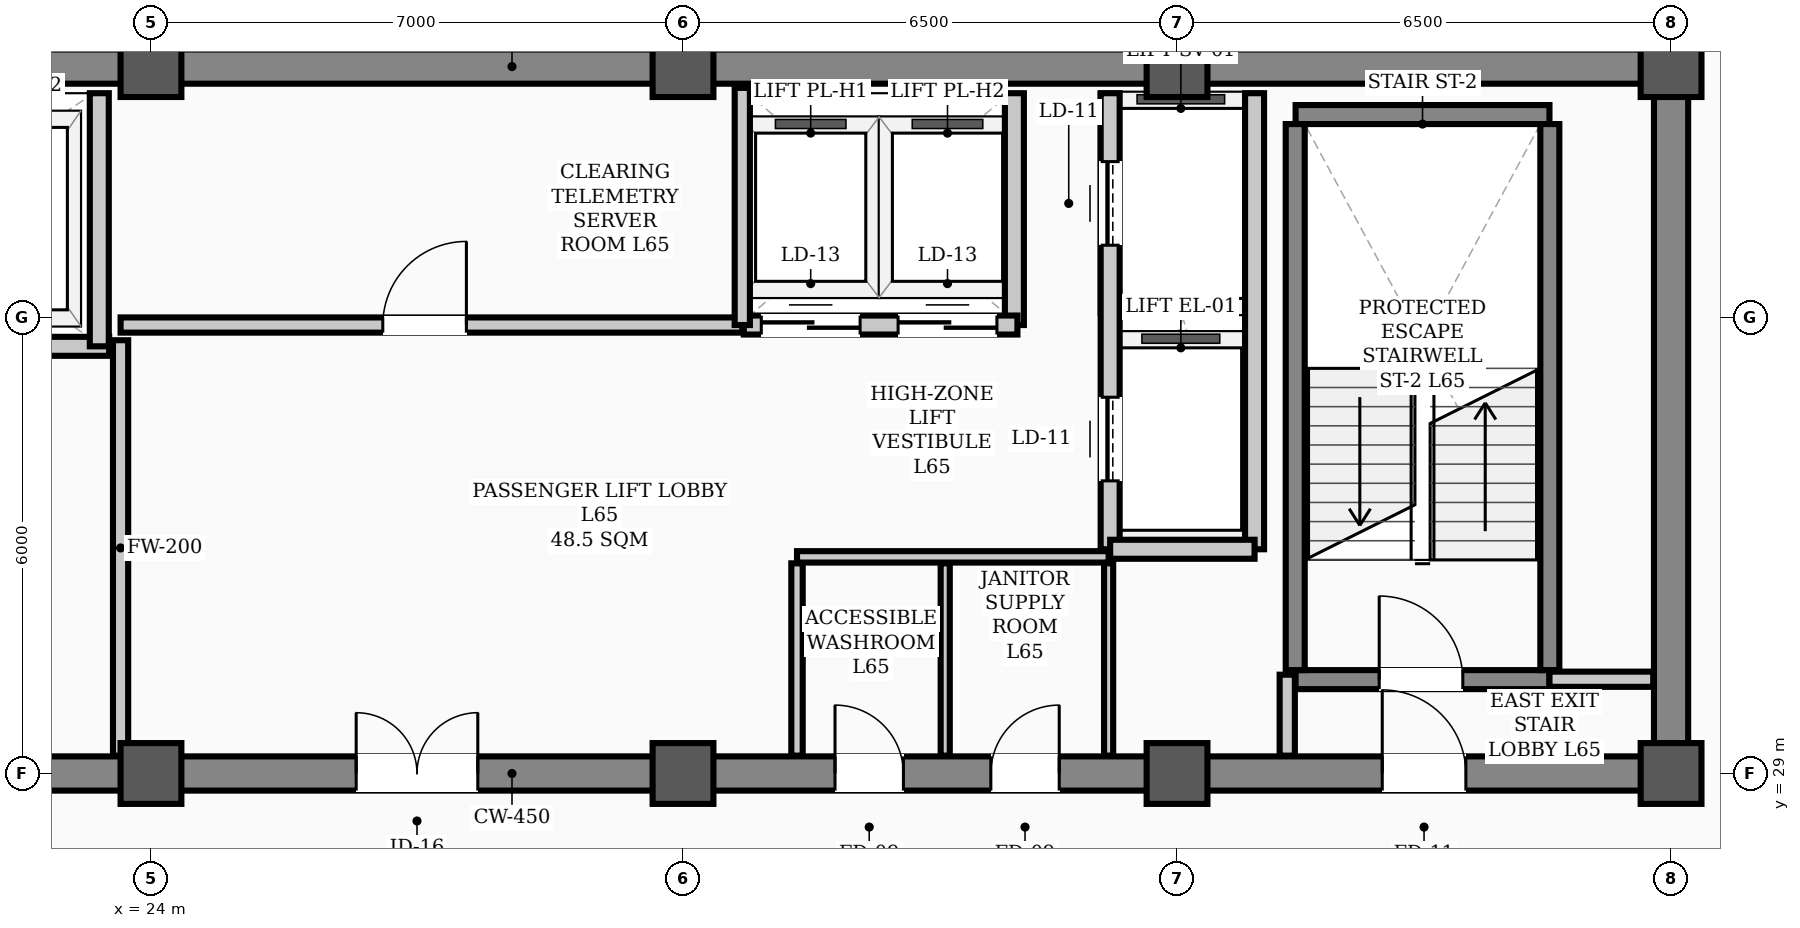
"""IFC4 building model, lengths in metres.
Left out: names, types, materials, properties, quantities, classifications, styles, units other than length and angle.
Written with IfcOpenShell. Run it as: python <this file> out.ifc"""

import sys

from ifc_helpers import new_model, si_unit, direction, frame, frame_2d, origin, origin_2d, place, context, subcontext, project, spatial, rectangle, hollow_rectangle, extrude, element, fill, save


model = new_model("IFC4")
c1 = context("Model", 3, precision=1e-05, world=origin(), true_north=direction((0.0, 1.0)))
c2 = subcontext(c1, "Body", "Model", "MODEL_VIEW")
j1 = project(units=[si_unit("LENGTHUNIT", "METRE"), si_unit("PLANEANGLEUNIT", "RADIAN")], contexts=[c1])
p1 = place(None, origin())
s1 = spatial("IfcSite", under=j1, at=p1, CompositionType="ELEMENT")
p2 = place(p1, origin())
s2 = spatial("IfcBuilding", under=s1, at=p2, CompositionType="ELEMENT")
p3 = place(p2, frame((0.0, 0.0, 261.8)))
s3 = spatial("IfcBuildingStorey", under=s2, at=p3, CompositionType="ELEMENT", Elevation=261.8)
for number, where, z_axis, x_axis in (
    (1, (24.0, 29.0, 0.0), (0.0, 0.0, 1.0), (1.0, 0.0, 0.0)),
    (2, (24.0, 38.3, 0.0), (0.0, 0.0, 1.0), (1.0, 0.0, 0.0)),
    (3, (31.0, 29.0, 0.0), (0.0, 0.0, 1.0), (1.0, 0.0, 0.0)),
    (4, (31.0, 38.3, 0.0), (0.0, 0.0, 1.0), (1.0, 0.0, 0.0)),
    (5, (37.5, 29.0, 0.0), (0.0, 0.0, 1.0), (1.0, 0.0, 0.0)),
    (6, (37.5, 38.3, 0.0), (0.0, 0.0, 1.0), (1.0, 0.0, 0.0)),
    (7, (44.0, 29.0, 0.0), (0.0, 0.0, 1.0), (1.0, 0.0, 0.0)),
    (8, (44.0, 38.3, 0.0), (0.0, 0.0, 1.0), (1.0, 0.0, 0.0)),
):
    element("IfcColumn", number, at=place(p3, frame(where, z_axis=z_axis, x_axis=x_axis)), inside=s3, PredefinedType="COLUMN", context=c2, shape_type="SweptSolid", body=[
        extrude(hollow_rectangle(XDim=0.8, YDim=0.8, WallThickness=0.032, InnerFilletRadius=0.016, OuterFilletRadius=0.048, at=origin_2d()), origin(), (0.0, 0.0, 1.0), 3.9),
    ])
p4 = place(p3, frame((13.5, 29.0, 0.0), z_axis=(0.0, 0.0, 1.0), x_axis=(1.0, 0.0, 0.0)))
e9 = element("IfcWall", 9, at=p4, inside=s3, PredefinedType="SHEAR", context=c2, shape_type="SweptSolid", body=[
    extrude(rectangle(XDim=30.5, YDim=0.45, at=frame_2d((15.25, 0.0))), origin(), (0.0, 0.0, 1.0), 3.72),
])
p5 = place(p4, frame((1.75, 0.0, 0.0)))
e10 = element("IfcOpeningElement", 10, at=p5, cuts=e9, PredefinedType="OPENING", context=c2, shape_type="SweptSolid", body=[
    extrude(rectangle(XDim=1.1, YDim=2.08, at=frame_2d((0.55, 1.04))), frame((0.0, 0.235, 0.0), z_axis=(0.0, -1.0, 0.0), x_axis=(1.0, 0.0, 0.0)), (0.0, 0.0, 1.0), 0.47),
])
p6 = place(p4, frame((26.7, 0.0, 0.0)))
e11 = element("IfcOpeningElement", 11, at=p6, cuts=e9, PredefinedType="OPENING", context=c2, shape_type="SweptSolid", body=[
    extrude(rectangle(XDim=1.1, YDim=2.08, at=frame_2d((0.55, 1.04))), frame((0.0, 0.235, 0.0), z_axis=(0.0, -1.0, 0.0), x_axis=(1.0, 0.0, 0.0)), (0.0, 0.0, 1.0), 0.47),
])
p7 = place(p4, frame((6.8, 0.0, 0.0)))
e12 = element("IfcOpeningElement", 12, at=p7, cuts=e9, PredefinedType="OPENING", context=c2, shape_type="SweptSolid", body=[
    extrude(rectangle(XDim=1.1, YDim=2.08, at=frame_2d((0.55, 1.04))), frame((0.0, 0.235, 0.0), z_axis=(0.0, -1.0, 0.0), x_axis=(1.0, 0.0, 0.0)), (0.0, 0.0, 1.0), 0.47),
])
p8 = place(p4, frame((13.2, 0.0, 0.0)))
e13 = element("IfcOpeningElement", 13, at=p8, cuts=e9, PredefinedType="OPENING", context=c2, shape_type="SweptSolid", body=[
    extrude(rectangle(XDim=1.6, YDim=2.08, at=frame_2d((0.8, 1.04))), frame((0.0, 0.235, 0.0), z_axis=(0.0, -1.0, 0.0), x_axis=(1.0, 0.0, 0.0)), (0.0, 0.0, 1.0), 0.47),
])
p9 = place(p4, frame((19.5, 0.0, 0.0)))
e14 = element("IfcOpeningElement", 14, at=p9, cuts=e9, PredefinedType="OPENING", context=c2, shape_type="SweptSolid", body=[
    extrude(rectangle(XDim=0.9, YDim=2.08, at=frame_2d((0.45, 1.04))), frame((0.0, 0.235, 0.0), z_axis=(0.0, -1.0, 0.0), x_axis=(1.0, 0.0, 0.0)), (0.0, 0.0, 1.0), 0.47),
])
p10 = place(p4, frame((21.55, 0.0, 0.0)))
e15 = element("IfcOpeningElement", 15, at=p10, cuts=e9, PredefinedType="OPENING", context=c2, shape_type="SweptSolid", body=[
    extrude(rectangle(XDim=0.9, YDim=2.08, at=frame_2d((0.45, 1.04))), frame((0.0, 0.235, 0.0), z_axis=(0.0, -1.0, 0.0), x_axis=(1.0, 0.0, 0.0)), (0.0, 0.0, 1.0), 0.47),
])
p11 = place(p3, frame((13.5, 38.3, 0.0), z_axis=(0.0, 0.0, 1.0), x_axis=(1.0, 0.0, 0.0)))
e16 = element("IfcWall", 16, at=p11, inside=s3, PredefinedType="SHEAR", context=c2, shape_type="SweptSolid", body=[
    extrude(rectangle(XDim=30.5, YDim=0.45, at=frame_2d((15.25, 0.0))), origin(), (0.0, 0.0, 1.0), 3.72),
])
p12 = place(p3, frame((44.0, 29.35, 0.0), z_axis=(0.0, 0.0, 1.0), x_axis=(0.0, 1.0, 0.0)))
e17 = element("IfcWall", 17, at=p12, inside=s3, PredefinedType="SHEAR", context=c2, shape_type="SweptSolid", body=[
    extrude(rectangle(XDim=8.6, YDim=0.45, at=frame_2d((4.3, 0.0))), origin(), (0.0, 0.0, 1.0), 3.72),
])
p13 = place(p3, frame((39.06, 30.235, 0.0), z_axis=(0.0, 0.0, 1.0), x_axis=(1.0, 0.0, 0.0)))
e18 = element("IfcWall", 18, at=p13, inside=s3, PredefinedType="STANDARD", context=c2, shape_type="SweptSolid", body=[
    extrude(rectangle(XDim=3.34, YDim=0.25, at=frame_2d((1.67, 0.0))), origin(), (0.0, 0.0, 1.0), 3.72),
])
p14 = place(p13, frame((1.1, 0.0, 0.0)))
e19 = element("IfcOpeningElement", 19, at=p14, cuts=e18, PredefinedType="OPENING", context=c2, shape_type="SweptSolid", body=[
    extrude(rectangle(XDim=1.1, YDim=2.08, at=frame_2d((0.55, 1.04))), frame((0.0, 0.135, 0.0), z_axis=(0.0, -1.0, 0.0), x_axis=(1.0, 0.0, 0.0)), (0.0, 0.0, 1.0), 0.27),
])
p15 = place(p3, frame((39.06, 37.669, 0.0), z_axis=(0.0, 0.0, 1.0), x_axis=(1.0, 0.0, 0.0)))
e20 = element("IfcWall", 20, at=p15, inside=s3, PredefinedType="STANDARD", context=c2, shape_type="SweptSolid", body=[
    extrude(rectangle(XDim=3.34, YDim=0.25, at=frame_2d((1.67, 0.0))), origin(), (0.0, 0.0, 1.0), 3.72),
])
for number, where, z_axis, x_axis in (
    (21, (39.055, 30.36, 0.0), (0.0, 0.0, 1.0), (0.0, 1.0, 0.0)),
    (22, (42.405, 30.36, 0.0), (0.0, 0.0, 1.0), (0.0, 1.0, 0.0)),
):
    element("IfcWall", number, at=place(p3, frame(where, z_axis=z_axis, x_axis=x_axis)), inside=s3, PredefinedType="STANDARD", context=c2, shape_type="SweptSolid", body=[
        extrude(rectangle(XDim=7.184, YDim=0.25, at=frame_2d((3.592, 0.0))), origin(), (0.0, 0.0, 1.0), 3.72),
    ])
p16 = place(p3, frame((18.1, 34.62, 0.0), z_axis=(0.0, 0.0, 1.0), x_axis=(1.0, 0.0, 0.0)))
e23 = element("IfcWall", 23, at=p16, inside=s3, PredefinedType="STANDARD", context=c2, shape_type="SweptSolid", body=[
    extrude(rectangle(XDim=5.35, YDim=0.25, at=frame_2d((2.675, 0.0))), origin(), (0.0, 0.0, 1.0), 3.72),
])
p17 = place(p16, frame((0.85, 0.0, 0.0)))
e24 = element("IfcOpeningElement", 24, at=p17, cuts=e23, PredefinedType="OPENING", context=c2, shape_type="SweptSolid", body=[
    extrude(rectangle(XDim=1.1, YDim=2.08, at=frame_2d((0.55, 1.04))), frame((0.0, 0.135, 0.0), z_axis=(0.0, -1.0, 0.0), x_axis=(1.0, 0.0, 0.0)), (0.0, 0.0, 1.0), 0.27),
])
p18 = place(p16, frame((3.45, 0.0, 0.0)))
e25 = element("IfcOpeningElement", 25, at=p18, cuts=e23, PredefinedType="OPENING", context=c2, shape_type="SweptSolid", body=[
    extrude(rectangle(XDim=1.1, YDim=2.08, at=frame_2d((0.55, 1.04))), frame((0.0, 0.135, 0.0), z_axis=(0.0, -1.0, 0.0), x_axis=(1.0, 0.0, 0.0)), (0.0, 0.0, 1.0), 0.27),
])
p19 = place(p3, frame((36.62, 31.95, 0.0), z_axis=(0.0, 0.0, 1.0), x_axis=(0.0, 1.0, 0.0)))
e26 = element("IfcWall", 26, at=p19, inside=s3, PredefinedType="STANDARD", context=c2, shape_type="SweptSolid", body=[
    extrude(rectangle(XDim=6.0, YDim=0.25, at=frame_2d((3.0, 0.0))), origin(), (0.0, 0.0, 1.0), 3.4),
])
p20 = place(p19, frame((0.9, 0.0, 0.0)))
e27 = element("IfcOpeningElement", 27, at=p20, cuts=e26, PredefinedType="OPENING", context=c2, shape_type="SweptSolid", body=[
    extrude(rectangle(XDim=1.1, YDim=2.08, at=frame_2d((0.55, 1.04))), frame((0.0, 0.135, 0.0), z_axis=(0.0, -1.0, 0.0), x_axis=(1.0, 0.0, 0.0)), (0.0, 0.0, 1.0), 0.27),
])
p21 = place(p19, frame((4.0, 0.0, 0.0)))
e28 = element("IfcOpeningElement", 28, at=p21, cuts=e26, PredefinedType="OPENING", context=c2, shape_type="SweptSolid", body=[
    extrude(rectangle(XDim=1.1, YDim=2.08, at=frame_2d((0.55, 1.04))), frame((0.0, 0.135, 0.0), z_axis=(0.0, -1.0, 0.0), x_axis=(1.0, 0.0, 0.0)), (0.0, 0.0, 1.0), 0.27),
])
p22 = place(p3, frame((38.52, 31.95, 0.0), z_axis=(0.0, 0.0, 1.0), x_axis=(0.0, 1.0, 0.0)))
e29 = element("IfcWall", 29, at=p22, inside=s3, PredefinedType="STANDARD", context=c2, shape_type="SweptSolid", body=[
    extrude(rectangle(XDim=6.0, YDim=0.25, at=frame_2d((3.0, 0.0))), origin(), (0.0, 0.0, 1.0), 3.48),
])
p23 = place(p3, frame((36.62, 31.95, 0.0), z_axis=(0.0, 0.0, 1.0), x_axis=(1.0, 0.0, 0.0)))
e30 = element("IfcWall", 30, at=p23, inside=s3, PredefinedType="STANDARD", context=c2, shape_type="SweptSolid", body=[
    extrude(rectangle(XDim=1.9, YDim=0.25, at=frame_2d((0.95, 0.0))), origin(), (0.0, 0.0, 1.0), 3.48),
])
p24 = place(p3, frame((23.32, 34.62, 0.0), z_axis=(0.0, 0.0, 1.0), x_axis=(0.0, 1.0, 0.0)))
e31 = element("IfcWall", 31, at=p24, inside=s3, PredefinedType="STANDARD", context=c2, shape_type="SweptSolid", body=[
    extrude(rectangle(XDim=3.33, YDim=0.25, at=frame_2d((1.665, 0.0))), origin(), (0.0, 0.0, 1.0), 3.4),
])
p25 = place(p3, frame((35.36, 34.9, 0.0), z_axis=(0.0, 0.0, 1.0), x_axis=(0.0, 1.0, 0.0)))
e32 = element("IfcWall", 32, at=p25, inside=s3, PredefinedType="STANDARD", context=c2, shape_type="SweptSolid", body=[
    extrude(rectangle(XDim=3.05, YDim=0.25, at=frame_2d((1.525, 0.0))), origin(), (0.0, 0.0, 1.0), 3.4),
])
p26 = place(p3, frame((31.8, 34.9, 0.0), z_axis=(0.0, 0.0, 1.0), x_axis=(1.0, 0.0, 0.0)))
e33 = element("IfcWall", 33, at=p26, inside=s3, PredefinedType="STANDARD", context=c2, shape_type="SweptSolid", body=[
    extrude(rectangle(XDim=3.6, YDim=0.25, at=frame_2d((1.8, 0.0))), origin(), (0.0, 0.0, 1.0), 3.72),
])
p27 = place(p26, frame((0.23, 0.0, 0.0)))
e34 = element("IfcOpeningElement", 34, at=p27, cuts=e33, PredefinedType="OPENING", context=c2, shape_type="SweptSolid", body=[
    extrude(rectangle(XDim=1.3, YDim=2.08, at=frame_2d((0.65, 1.04))), frame((0.0, 0.135, 0.0), z_axis=(0.0, -1.0, 0.0), x_axis=(1.0, 0.0, 0.0)), (0.0, 0.0, 1.0), 0.27),
])
p28 = place(p26, frame((2.03, 0.0, 0.0)))
e35 = element("IfcOpeningElement", 35, at=p28, cuts=e33, PredefinedType="OPENING", context=c2, shape_type="SweptSolid", body=[
    extrude(rectangle(XDim=1.3, YDim=2.08, at=frame_2d((0.65, 1.04))), frame((0.0, 0.135, 0.0), z_axis=(0.0, -1.0, 0.0), x_axis=(1.0, 0.0, 0.0)), (0.0, 0.0, 1.0), 0.27),
])
p29 = place(p3, frame((42.4, 30.24, 0.0), z_axis=(0.0, 0.0, 1.0), x_axis=(1.0, 0.0, 0.0)))
e36 = element("IfcWall", 36, at=p29, inside=s3, PredefinedType="STANDARD", context=c2, shape_type="SweptSolid", body=[
    extrude(rectangle(XDim=1.365, YDim=0.2, at=frame_2d((0.683, 0.0))), origin(), (0.0, 0.0, 1.0), 3.72),
])
p30 = place(p3, frame((23.6, 34.9, 0.0), z_axis=(0.0, 0.0, 1.0), x_axis=(1.0, 0.0, 0.0)))
e37 = element("IfcWall", 37, at=p30, inside=s3, PredefinedType="STANDARD", context=c2, shape_type="SweptSolid", body=[
    extrude(rectangle(XDim=8.18, YDim=0.2, at=frame_2d((4.09, 0.0))), origin(), (0.0, 0.0, 1.0), 3.72),
])
p31 = place(p30, frame((3.45, 0.0, 0.0)))
e38 = element("IfcOpeningElement", 38, at=p31, cuts=e37, PredefinedType="OPENING", context=c2, shape_type="SweptSolid", body=[
    extrude(rectangle(XDim=1.1, YDim=2.08, at=frame_2d((0.55, 1.04))), frame((0.0, 0.11, 0.0), z_axis=(0.0, -1.0, 0.0), x_axis=(1.0, 0.0, 0.0)), (0.0, 0.0, 1.0), 0.22),
])
p32 = place(p3, frame((32.5, 31.85, 0.0), z_axis=(0.0, 0.0, 1.0), x_axis=(1.0, 0.0, 0.0)))
e39 = element("IfcWall", 39, at=p32, inside=s3, PredefinedType="PARTITIONING", context=c2, shape_type="SweptSolid", body=[
    extrude(rectangle(XDim=4.1, YDim=0.15, at=frame_2d((2.05, 0.0))), origin(), (0.0, 0.0, 1.0), 3.72),
])
p33 = place(p3, frame((38.95, 29.235, 0.0), z_axis=(0.0, 0.0, 1.0), x_axis=(0.0, 1.0, 0.0)))
e40 = element("IfcWall", 40, at=p33, inside=s3, PredefinedType="STANDARD", context=c2, shape_type="SweptSolid", body=[
    extrude(rectangle(XDim=1.065, YDim=0.2, at=frame_2d((0.532, 0.0))), origin(), (0.0, 0.0, 1.0), 3.72),
])
p34 = place(p3, frame((23.6, 29.235, 0.0), z_axis=(0.0, 0.0, 1.0), x_axis=(0.0, 1.0, 0.0)))
e41 = element("IfcWall", 41, at=p34, inside=s3, PredefinedType="STANDARD", context=c2, shape_type="SweptSolid", body=[
    extrude(rectangle(XDim=5.465, YDim=0.2, at=frame_2d((2.732, 0.0))), origin(), (0.0, 0.0, 1.0), 3.2),
])
p35 = place(p3, frame((32.5, 29.235, 0.0), z_axis=(0.0, 0.0, 1.0), x_axis=(0.0, 1.0, 0.0)))
e42 = element("IfcWall", 42, at=p35, inside=s3, PredefinedType="PARTITIONING", context=c2, shape_type="SweptSolid", body=[
    extrude(rectangle(XDim=2.53, YDim=0.15, at=frame_2d((1.265, 0.0))), origin(), (0.0, 0.0, 1.0), 3.4),
])
for number, where, z_axis, x_axis in (
    (43, (36.6, 29.235, 0.0), (0.0, 0.0, 1.0), (0.0, 1.0, 0.0)),
    (44, (34.45, 29.235, 0.0), (0.0, 0.0, 1.0), (0.0, 1.0, 0.0)),
):
    element("IfcWall", number, at=place(p3, frame(where, z_axis=z_axis, x_axis=x_axis)), inside=s3, PredefinedType="PARTITIONING", context=c2, shape_type="SweptSolid", body=[
        extrude(rectangle(XDim=2.53, YDim=0.12, at=frame_2d((1.265, 0.0))), origin(), (0.0, 0.0, 1.0), 3.4),
    ])
p36 = place(p3, frame((31.78, 34.9, 0.0), z_axis=(0.0, 0.0, 1.0), x_axis=(0.0, 1.0, 0.0)))
e45 = element("IfcWall", 45, at=p36, inside=s3, PredefinedType="STANDARD", context=c2, shape_type="SweptSolid", body=[
    extrude(rectangle(XDim=3.12, YDim=0.2, at=frame_2d((1.56, 0.0))), origin(), (0.0, 0.0, 1.0), 3.4),
])
p37 = place(p14, origin())
e46 = element("IfcDoor", 46, at=p37, inside=s3, OperationType="SINGLE_SWING_LEFT", PredefinedType="DOOR", context=c2, shape_type="SweptSolid", body=[
    extrude(rectangle(XDim=1.1, YDim=2.08, at=frame_2d((0.55, 1.04))), frame((0.0, 0.025, 0.0), z_axis=(0.0, -1.0, 0.0), x_axis=(1.0, 0.0, 0.0)), (0.0, 0.0, 1.0), 0.05),
])
fill(e19, e46)
p38 = place(p6, origin())
e47 = element("IfcDoor", 47, at=p38, inside=s3, OperationType="SINGLE_SWING_LEFT", PredefinedType="DOOR", context=c2, shape_type="SweptSolid", body=[
    extrude(rectangle(XDim=1.1, YDim=2.08, at=frame_2d((0.55, 1.04))), frame((0.0, 0.025, 0.0), z_axis=(0.0, -1.0, 0.0), x_axis=(1.0, 0.0, 0.0)), (0.0, 0.0, 1.0), 0.05),
])
fill(e11, e47)
p39 = place(p8, origin())
e48 = element("IfcDoor", 48, at=p39, inside=s3, OperationType="DOUBLE_DOOR_SINGLE_SWING", PredefinedType="DOOR", context=c2, shape_type="SweptSolid", body=[
    extrude(rectangle(XDim=1.6, YDim=2.08, at=frame_2d((0.8, 1.04))), frame((0.0, 0.025, 0.0), z_axis=(0.0, -1.0, 0.0), x_axis=(1.0, 0.0, 0.0)), (0.0, 0.0, 1.0), 0.05),
])
fill(e13, e48)
p40 = place(p31, origin())
e49 = element("IfcDoor", 49, at=p40, inside=s3, OperationType="SINGLE_SWING_RIGHT", PredefinedType="DOOR", context=c2, shape_type="SweptSolid", body=[
    extrude(rectangle(XDim=1.1, YDim=2.08, at=frame_2d((0.55, 1.04))), frame((0.0, 0.025, 0.0), z_axis=(0.0, -1.0, 0.0), x_axis=(1.0, 0.0, 0.0)), (0.0, 0.0, 1.0), 0.05),
])
fill(e38, e49)
p41 = place(p9, origin())
e50 = element("IfcDoor", 50, at=p41, inside=s3, OperationType="SINGLE_SWING_LEFT", PredefinedType="DOOR", context=c2, shape_type="SweptSolid", body=[
    extrude(rectangle(XDim=0.9, YDim=2.08, at=frame_2d((0.45, 1.04))), frame((0.0, 0.025, 0.0), z_axis=(0.0, -1.0, 0.0), x_axis=(1.0, 0.0, 0.0)), (0.0, 0.0, 1.0), 0.05),
])
fill(e14, e50)
p42 = place(p10, origin())
e51 = element("IfcDoor", 51, at=p42, inside=s3, OperationType="SINGLE_SWING_RIGHT", PredefinedType="DOOR", context=c2, shape_type="SweptSolid", body=[
    extrude(rectangle(XDim=0.9, YDim=2.08, at=frame_2d((0.45, 1.04))), frame((0.0, 0.025, 0.0), z_axis=(0.0, -1.0, 0.0), x_axis=(1.0, 0.0, 0.0)), (0.0, 0.0, 1.0), 0.05),
])
fill(e15, e51)
p43 = place(p20, origin())
e52 = element("IfcDoor", 52, at=p43, inside=s3, OperationType="SLIDING_TO_LEFT", PredefinedType="DOOR", context=c2, shape_type="SweptSolid", body=[
    extrude(rectangle(XDim=1.1, YDim=2.08, at=frame_2d((0.55, 1.04))), frame((0.0, 0.025, 0.0), z_axis=(0.0, -1.0, 0.0), x_axis=(1.0, 0.0, 0.0)), (0.0, 0.0, 1.0), 0.05),
])
fill(e27, e52)
p44 = place(p21, origin())
e53 = element("IfcDoor", 53, at=p44, inside=s3, OperationType="SLIDING_TO_LEFT", PredefinedType="DOOR", context=c2, shape_type="SweptSolid", body=[
    extrude(rectangle(XDim=1.1, YDim=2.08, at=frame_2d((0.55, 1.04))), frame((0.0, 0.025, 0.0), z_axis=(0.0, -1.0, 0.0), x_axis=(1.0, 0.0, 0.0)), (0.0, 0.0, 1.0), 0.05),
])
fill(e28, e53)
p45 = place(p27, origin())
e54 = element("IfcDoor", 54, at=p45, inside=s3, OperationType="DOUBLE_DOOR_SLIDING", PredefinedType="DOOR", context=c2, shape_type="SweptSolid", body=[
    extrude(rectangle(XDim=1.3, YDim=2.08, at=frame_2d((0.65, 1.04))), frame((0.0, 0.025, 0.0), z_axis=(0.0, -1.0, 0.0), x_axis=(1.0, 0.0, 0.0)), (0.0, 0.0, 1.0), 0.05),
])
fill(e34, e54)
p46 = place(p28, origin())
e55 = element("IfcDoor", 55, at=p46, inside=s3, OperationType="DOUBLE_DOOR_SLIDING", PredefinedType="DOOR", context=c2, shape_type="SweptSolid", body=[
    extrude(rectangle(XDim=1.3, YDim=2.08, at=frame_2d((0.65, 1.04))), frame((0.0, 0.025, 0.0), z_axis=(0.0, -1.0, 0.0), x_axis=(1.0, 0.0, 0.0)), (0.0, 0.0, 1.0), 0.05),
])
fill(e35, e55)
save(model, sys.argv[1])
